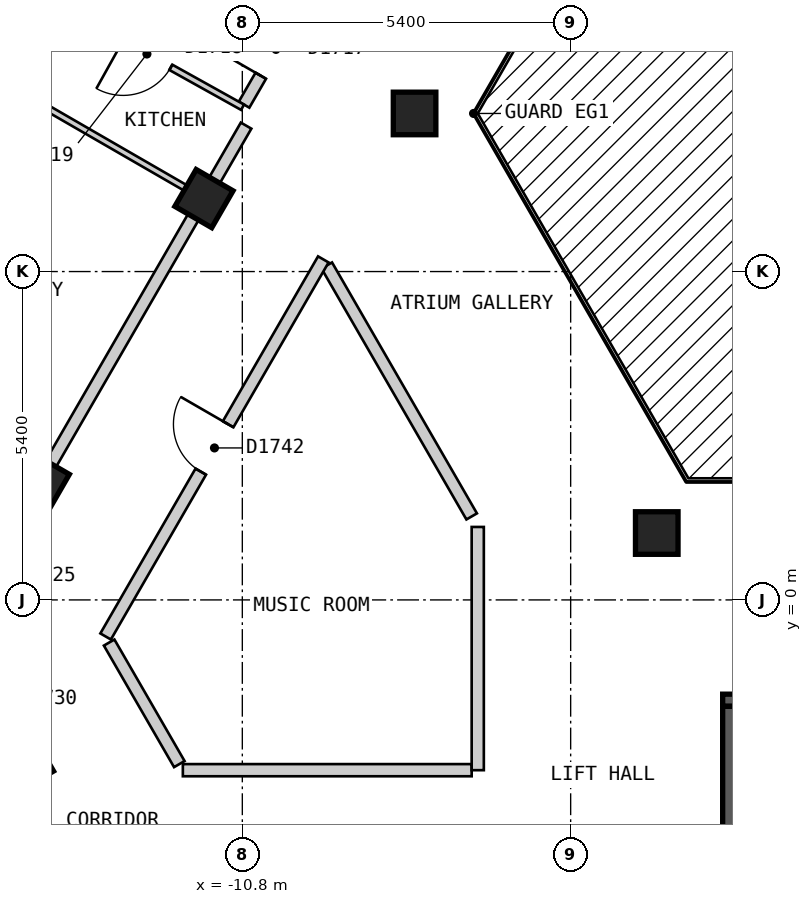
"""IFC4 building model, lengths in metres.
Left out: names, types, materials, properties, quantities, classifications, styles, units other than length and angle.
Written with IfcOpenShell. Run it as: python <this file> out.ifc"""

import sys

from ifc_helpers import new_model, si_unit, direction, frame, frame_2d, origin, origin_2d, place, context, subcontext, project, spatial, rectangle, extrude, element, fill, save


model = new_model("IFC4")
c1 = context("Model", 3, precision=1e-05, world=origin(), true_north=direction((0.0, 1.0)))
c2 = subcontext(c1, "Body", "Model", "MODEL_VIEW")
j1 = project(units=[si_unit("LENGTHUNIT", "METRE"), si_unit("PLANEANGLEUNIT", "RADIAN")], contexts=[c1])
p1 = place(None, origin())
s1 = spatial("IfcSite", under=j1, at=p1, CompositionType="ELEMENT")
p2 = place(p1, origin())
s2 = spatial("IfcBuilding", under=s1, at=p2, CompositionType="ELEMENT")
p3 = place(p2, frame((0.0, 0.0, 181.2)))
s3 = spatial("IfcBuildingStorey", under=s2, at=p3, CompositionType="ELEMENT", Elevation=181.2)
for number, where, z_axis, x_axis in (
    (1, (-14.383, -2.687, 0.0), (0.0, 0.0, 1.0), (0.5, -0.866, 0.0)),
    (2, (-7.967, 8.0, 0.0), (0.0, 0.0, 1.0), (1.0, 0.0, 0.0)),
    (3, (-11.431, 6.6, 0.0), (0.0, 0.0, 1.0), (-0.5, -0.866, 0.0)),
    (4, (-3.984, 1.1, 0.0), (0.0, 0.0, 1.0), (1.0, 0.0, 0.0)),
    (5, (-14.123, 1.937, 0.0), (0.0, 0.0, 1.0), (-0.5, -0.866, 0.0)),
):
    element("IfcColumn", number, at=place(p3, frame(where, z_axis=z_axis, x_axis=x_axis)), inside=s3, PredefinedType="COLUMN", context=c2, shape_type="SweptSolid", body=[
        extrude(rectangle(XDim=0.7, YDim=0.7, at=origin_2d()), origin(), (0.0, 0.0, 1.0), 3.0),
    ])
p4 = place(p3, frame((-2.9, -1.65, 0.0), z_axis=(0.0, 0.0, 1.0), x_axis=(1.0, 0.0, 0.0)))
e6 = element("IfcWall", 6, at=p4, inside=s3, PredefinedType="SOLIDWALL", context=c2, shape_type="SweptSolid", body=[
    extrude(rectangle(XDim=5.8, YDim=0.2, at=frame_2d((2.9, 0.0))), origin(), (0.0, 0.0, 1.0), 2.7),
])
p5 = place(p4, frame((0.3, 0.0, 0.0)))
e7 = element("IfcOpeningElement", 7, at=p5, cuts=e6, PredefinedType="OPENING", context=c2, shape_type="SweptSolid", body=[
    extrude(rectangle(XDim=1.2, YDim=2.1, at=frame_2d((0.6, 1.05))), frame((0.0, 0.11, 0.0), z_axis=(0.0, -1.0, 0.0), x_axis=(1.0, 0.0, 0.0)), (0.0, 0.0, 1.0), 0.22),
])
p6 = place(p3, frame((-2.8, -4.5, 0.0), z_axis=(0.0, 0.0, 1.0), x_axis=(0.0, 1.0, 0.0)))
e8 = element("IfcWall", 8, at=p6, inside=s3, PredefinedType="SOLIDWALL", context=c2, shape_type="SweptSolid", body=[
    extrude(rectangle(XDim=2.75, YDim=0.2, at=frame_2d((1.375, 0.0))), origin(), (0.0, 0.0, 1.0), 2.7),
])
p7 = place(p3, frame((-9.411, 5.5, 0.0), z_axis=(0.0, 0.0, 1.0), x_axis=(0.500018099276, -0.86601495391, 0.0)))
e9 = element("IfcWall", 9, at=p7, inside=s3, PredefinedType="PARTITIONING", context=c2, shape_type="SweptSolid", body=[
    extrude(rectangle(XDim=4.765, YDim=0.2, at=frame_2d((2.383, 0.0))), origin(), (0.0, 0.0, 1.0), 2.7),
])
p8 = place(p3, frame((-12.99, -0.701, 0.0), z_axis=(0.0, 0.0, 1.0), x_axis=(0.499972710878, -0.866041158593, 0.0)))
e10 = element("IfcWall", 10, at=p8, inside=s3, PredefinedType="PARTITIONING", context=c2, shape_type="SweptSolid", body=[
    extrude(rectangle(XDim=2.308, YDim=0.2, at=frame_2d((1.154, 0.0))), origin(), (0.0, 0.0, 1.0), 2.7),
])
p9 = place(p3, frame((-11.778, -2.8, 0.0), z_axis=(0.0, 0.0, 1.0), x_axis=(1.0, 0.0, 0.0)))
e11 = element("IfcWall", 11, at=p9, inside=s3, PredefinedType="PARTITIONING", context=c2, shape_type="SweptSolid", body=[
    extrude(rectangle(XDim=4.75, YDim=0.2, at=frame_2d((2.375, 0.0))), origin(), (0.0, 0.0, 1.0), 2.7),
])
p10 = place(p3, frame((-13.048, -0.601, 0.0), z_axis=(0.0, 0.0, 1.0), x_axis=(0.499982180423, 0.866035691677, 0.0)))
e12 = element("IfcWall", 12, at=p10, inside=s3, PredefinedType="PARTITIONING", context=c2, shape_type="SweptSolid", body=[
    extrude(rectangle(XDim=7.16, YDim=0.2, at=frame_2d((3.58, 0.0))), origin(), (0.0, 0.0, 1.0), 2.7),
])
p11 = place(p10, frame((3.13, 0.0, 0.0)))
e13 = element("IfcOpeningElement", 13, at=p11, cuts=e12, PredefinedType="OPENING", context=c2, shape_type="SweptSolid", body=[
    extrude(rectangle(XDim=0.9, YDim=2.1, at=frame_2d((0.45, 1.05))), frame((0.0, 0.11, 0.0), z_axis=(0.0, -1.0, 0.0), x_axis=(1.0, 0.0, 0.0)), (0.0, 0.0, 1.0), 0.22),
])
p12 = place(p3, frame((-15.53, -0.501, 0.0), z_axis=(0.0, 0.0, 1.0), x_axis=(0.499952498232, 0.866052827206, 0.0)))
e14 = element("IfcWall", 14, at=p12, inside=s3, PredefinedType="PARTITIONING", context=c2, shape_type="SweptSolid", body=[
    extrude(rectangle(XDim=9.585, YDim=0.2, at=frame_2d((4.792, 0.0))), origin(), (0.0, 0.0, 1.0), 2.7),
])
p13 = place(p12, frame((0.525, 0.0, 0.0)))
e15 = element("IfcOpeningElement", 15, at=p13, cuts=e14, PredefinedType="OPENING", context=c2, shape_type="SweptSolid", body=[
    extrude(rectangle(XDim=1.0, YDim=2.1, at=frame_2d((0.5, 1.05))), frame((0.0, 0.11, 0.0), z_axis=(0.0, -1.0, 0.0), x_axis=(1.0, 0.0, 0.0)), (0.0, 0.0, 1.0), 0.22),
])
p14 = place(p3, frame((-10.771, 8.145, 0.0), z_axis=(0.0, 0.0, 1.0), x_axis=(0.500048075867, 0.865997645391, 0.0)))
e16 = element("IfcWall", 16, at=p14, inside=s3, PredefinedType="PARTITIONING", context=c2, shape_type="SweptSolid", body=[
    extrude(rectangle(XDim=10.687, YDim=0.2, at=frame_2d((5.344, 0.0))), origin(), (0.0, 0.0, 1.0), 2.7),
])
p15 = place(p14, frame((0.549, 0.0, 0.0)))
e17 = element("IfcOpeningElement", 17, at=p15, cuts=e16, PredefinedType="OPENING", context=c2, shape_type="SweptSolid", body=[
    extrude(rectangle(XDim=1.0, YDim=2.1, at=frame_2d((0.5, 1.05))), frame((0.0, 0.11, 0.0), z_axis=(0.0, -1.0, 0.0), x_axis=(1.0, 0.0, 0.0)), (0.0, 0.0, 1.0), 0.22),
])
p16 = place(p3, frame((-6.928, -2.8, 0.0), z_axis=(0.0, 0.0, 1.0), x_axis=(0.0, 1.0, 0.0)))
e18 = element("IfcWall", 18, at=p16, inside=s3, PredefinedType="PARTITIONING", context=c2, shape_type="SweptSolid", body=[
    extrude(rectangle(XDim=4.0, YDim=0.2, at=frame_2d((2.0, 0.0))), origin(), (0.0, 0.0, 1.0), 2.7),
])
p17 = place(p3, frame((-13.898, 9.829, 0.0), z_axis=(0.0, 0.0, 1.0), x_axis=(0.873715787747, -0.486436760784, 0.0)))
e19 = element("IfcWall", 19, at=p17, inside=s3, PredefinedType="PARTITIONING", context=c2, shape_type="SweptSolid", body=[
    extrude(rectangle(XDim=3.55, YDim=0.1, at=frame_2d((1.775, 0.0))), origin(), (0.0, 0.0, 1.0), 2.7),
])
p18 = place(p17, frame((1.3, 0.0, 0.0)))
e20 = element("IfcOpeningElement", 20, at=p18, cuts=e19, PredefinedType="OPENING", context=c2, shape_type="SweptSolid", body=[
    extrude(rectangle(XDim=0.9, YDim=2.1, at=frame_2d((0.45, 1.05))), frame((0.0, 0.06, 0.0), z_axis=(0.0, -1.0, 0.0), x_axis=(1.0, 0.0, 0.0)), (0.0, 0.0, 1.0), 0.12),
])
p19 = place(p3, frame((-14.679, 8.475, 0.0), z_axis=(0.0, 0.0, 1.0), x_axis=(0.865995104784, -0.500052475737, 0.0)))
e21 = element("IfcWall", 21, at=p19, inside=s3, PredefinedType="PARTITIONING", context=c2, shape_type="SweptSolid", body=[
    extrude(rectangle(XDim=3.65, YDim=0.1, at=frame_2d((1.825, 0.0))), origin(), (0.0, 0.0, 1.0), 2.7),
])
p20 = place(p3, frame((-15.012, 8.0, 0.0), z_axis=(0.0, 0.0, 1.0), x_axis=(0.500047346826, 0.865998066356, 0.0)))
e22 = element("IfcWall", 22, at=p20, inside=s3, PredefinedType="PARTITIONING", context=c2, shape_type="SweptSolid", body=[
    extrude(rectangle(XDim=10.971, YDim=0.1, at=frame_2d((5.486, 0.0))), origin(), (0.0, 0.0, 1.0), 2.7),
])
p21 = place(p20, frame((2.791, 0.0, 0.0)))
e23 = element("IfcOpeningElement", 23, at=p21, cuts=e22, PredefinedType="OPENING", context=c2, shape_type="SweptSolid", body=[
    extrude(rectangle(XDim=0.9, YDim=2.1, at=frame_2d((0.45, 1.05))), frame((0.0, 0.06, 0.0), z_axis=(0.0, -1.0, 0.0), x_axis=(1.0, 0.0, 0.0)), (0.0, 0.0, 1.0), 0.12),
])
p22 = place(p20, frame((8.124, 0.0, 0.0)))
e24 = element("IfcOpeningElement", 24, at=p22, cuts=e22, PredefinedType="OPENING", context=c2, shape_type="SweptSolid", body=[
    extrude(rectangle(XDim=0.8, YDim=2.1, at=frame_2d((0.4, 1.05))), frame((0.0, 0.06, 0.0), z_axis=(0.0, -1.0, 0.0), x_axis=(1.0, 0.0, 0.0)), (0.0, 0.0, 1.0), 0.12),
])
p23 = place(p15, origin())
e25 = element("IfcDoor", 25, at=p23, inside=s3, OperationType="SINGLE_SWING_LEFT", PredefinedType="DOOR", context=c2, shape_type="SweptSolid", body=[
    extrude(rectangle(XDim=1.0, YDim=2.1, at=frame_2d((0.5, 1.05))), frame((0.0, 0.025, 0.0), z_axis=(0.0, -1.0, 0.0), x_axis=(1.0, 0.0, 0.0)), (0.0, 0.0, 1.0), 0.05),
])
fill(e17, e25)
p24 = place(p18, origin())
e26 = element("IfcDoor", 26, at=p24, inside=s3, OperationType="SINGLE_SWING_LEFT", PredefinedType="DOOR", context=c2, shape_type="SweptSolid", body=[
    extrude(rectangle(XDim=0.9, YDim=2.1, at=frame_2d((0.45, 1.05))), frame((0.0, 0.025, 0.0), z_axis=(0.0, -1.0, 0.0), x_axis=(1.0, 0.0, 0.0)), (0.0, 0.0, 1.0), 0.05),
])
fill(e20, e26)
p25 = place(p11, origin())
e27 = element("IfcDoor", 27, at=p25, inside=s3, OperationType="SINGLE_SWING_RIGHT", PredefinedType="DOOR", context=c2, shape_type="SweptSolid", body=[
    extrude(rectangle(XDim=0.9, YDim=2.1, at=frame_2d((0.45, 1.05))), frame((0.0, 0.025, 0.0), z_axis=(0.0, -1.0, 0.0), x_axis=(1.0, 0.0, 0.0)), (0.0, 0.0, 1.0), 0.05),
])
fill(e13, e27)
save(model, sys.argv[1])
